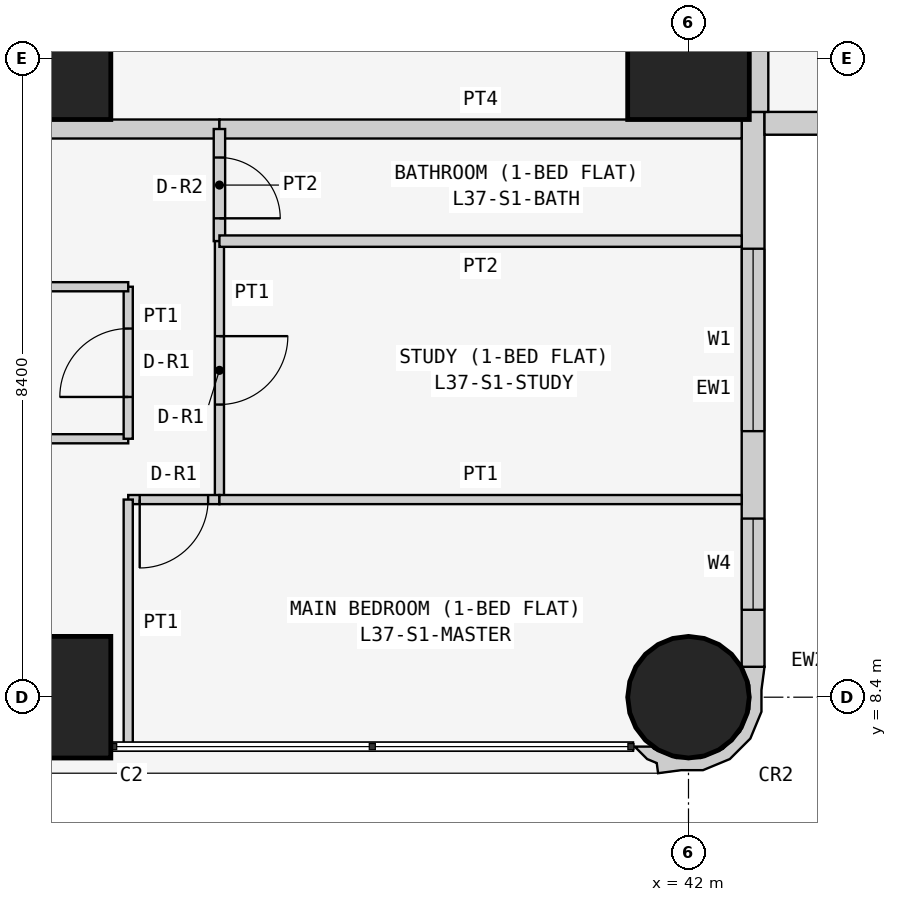
"""IFC4 building model, lengths in metres.
Left out: names, types, materials, properties, quantities, classifications, styles, units other than length and angle.
Written with IfcOpenShell. Run it as: python <this file> out.ifc"""

import sys

from ifc_helpers import new_model, si_unit, direction, frame, frame_2d, origin, origin_2d, place, context, subcontext, project, spatial, polyline, rectangle, circle, outline, extrude, element, fill, save


model = new_model("IFC4")
c1 = context("Model", 3, precision=1e-05, world=origin(), true_north=direction((0.0, 1.0)))
c2 = subcontext(c1, "Body", "Model", "MODEL_VIEW")
j1 = project(units=[si_unit("LENGTHUNIT", "METRE"), si_unit("PLANEANGLEUNIT", "RADIAN")], contexts=[c1])
p1 = place(None, origin())
s1 = spatial("IfcSite", under=j1, at=p1, CompositionType="ELEMENT")
p2 = place(p1, origin())
s2 = spatial("IfcBuilding", under=s1, at=p2, CompositionType="ELEMENT")
p3 = place(p2, frame((0.0, 0.0, 144.9)))
s3 = spatial("IfcBuildingStorey", under=s2, at=p3, CompositionType="ELEMENT", Elevation=144.9)
for number, where, z_axis, x_axis in (
    (1, (33.6, 8.4, 0.0), (0.0, 0.0, 1.0), (1.0, 0.0, 0.0)),
    (2, (33.6, 16.8, 0.0), (0.0, 0.0, 1.0), (1.0, 0.0, 0.0)),
):
    element("IfcColumn", number, at=place(p3, frame(where, z_axis=z_axis, x_axis=x_axis)), inside=s3, PredefinedType="COLUMN", context=c2, shape_type="SweptSolid", body=[
        extrude(rectangle(XDim=1.6, YDim=1.6, at=origin_2d()), origin(), (0.0, 0.0, 1.0), 3.6),
    ])
p4 = place(p3, frame((42.0, 8.4, 0.0), z_axis=(0.0, 0.0, 1.0), x_axis=(1.0, 0.0, 0.0)))
e3 = element("IfcColumn", 3, at=p4, inside=s3, PredefinedType="COLUMN", context=c2, shape_type="SweptSolid", body=[
    extrude(circle(Radius=0.8, at=origin_2d()), origin(), (0.0, 0.0, 1.0), 3.6),
])
p5 = place(p3, frame((42.0, 16.8, 0.0), z_axis=(0.0, 0.0, 1.0), x_axis=(1.0, 0.0, 0.0)))
e4 = element("IfcColumn", 4, at=p5, inside=s3, PredefinedType="COLUMN", context=c2, shape_type="SweptSolid", body=[
    extrude(rectangle(XDim=1.6, YDim=1.6, at=origin_2d()), origin(), (0.0, 0.0, 1.0), 3.6),
])
p6 = place(p3, frame((42.85, 8.8, 0.0), z_axis=(0.0, 0.0, 1.0), x_axis=(0.0, 1.0, 0.0)))
e5 = element("IfcWall", 5, at=p6, inside=s3, PredefinedType="SOLIDWALL", context=c2, shape_type="SweptSolid", body=[
    extrude(rectangle(XDim=7.3, YDim=0.3, at=frame_2d((3.65, 0.0))), origin(), (0.0, 0.0, 1.0), 3.45),
])
p7 = place(p6, frame((3.1, 0.0, 0.9)))
e6 = element("IfcOpeningElement", 6, at=p7, cuts=e5, PredefinedType="OPENING", context=c2, shape_type="SweptSolid", body=[
    extrude(rectangle(XDim=2.4, YDim=1.5, at=frame_2d((1.2, 0.75))), frame((0.0, 0.16, 0.0), z_axis=(0.0, -1.0, 0.0), x_axis=(1.0, 0.0, 0.0)), (0.0, 0.0, 1.0), 0.32),
])
p8 = place(p6, frame((0.75, 0.0, 0.9)))
e7 = element("IfcOpeningElement", 7, at=p8, cuts=e5, PredefinedType="OPENING", context=c2, shape_type="SweptSolid", body=[
    extrude(rectangle(XDim=1.2, YDim=1.5, at=frame_2d((0.6, 0.75))), frame((0.0, 0.16, 0.0), z_axis=(0.0, -1.0, 0.0), x_axis=(1.0, 0.0, 0.0)), (0.0, 0.0, 1.0), 0.32),
])
p9 = place(p3, frame((43.0, 15.95, 0.0), z_axis=(0.0, 0.0, 1.0), x_axis=(1.0, 0.0, 0.0)))
e8 = element("IfcWall", 8, at=p9, inside=s3, PredefinedType="SOLIDWALL", context=c2, shape_type="SweptSolid", body=[
    extrude(rectangle(XDim=15.4, YDim=0.3, at=frame_2d((7.7, 0.0))), origin(), (0.0, 0.0, 1.0), 3.45),
])
p10 = place(p9, frame((1.2, 0.0, 0.9)))
e9 = element("IfcOpeningElement", 9, at=p10, cuts=e8, PredefinedType="OPENING", context=c2, shape_type="SweptSolid", body=[
    extrude(rectangle(XDim=1.8, YDim=1.5, at=frame_2d((0.9, 0.75))), frame((0.0, 0.16, 0.0), z_axis=(0.0, -1.0, 0.0), x_axis=(1.0, 0.0, 0.0)), (0.0, 0.0, 1.0), 0.32),
])
p11 = place(p9, frame((4.95, 0.0, 1.5)))
e10 = element("IfcOpeningElement", 10, at=p11, cuts=e8, PredefinedType="OPENING", context=c2, shape_type="SweptSolid", body=[
    extrude(rectangle(XDim=0.9, YDim=0.7, at=frame_2d((0.45, 0.35))), frame((0.0, 0.16, 0.0), z_axis=(0.0, -1.0, 0.0), x_axis=(1.0, 0.0, 0.0)), (0.0, 0.0, 1.0), 0.32),
])
p12 = place(p9, frame((8.5, 0.0, 0.9)))
e11 = element("IfcOpeningElement", 11, at=p12, cuts=e8, PredefinedType="OPENING", context=c2, shape_type="SweptSolid", body=[
    extrude(rectangle(XDim=1.8, YDim=1.5, at=frame_2d((0.9, 0.75))), frame((0.0, 0.16, 0.0), z_axis=(0.0, -1.0, 0.0), x_axis=(1.0, 0.0, 0.0)), (0.0, 0.0, 1.0), 0.32),
])
p13 = place(p9, frame((12.5, 0.0, 0.0)))
e12 = element("IfcOpeningElement", 12, at=p13, cuts=e8, PredefinedType="OPENING", context=c2, shape_type="SweptSolid", body=[
    extrude(rectangle(XDim=0.9, YDim=2.4, at=frame_2d((0.45, 1.2))), frame((0.0, 0.16, 0.0), z_axis=(0.0, -1.0, 0.0), x_axis=(1.0, 0.0, 0.0)), (0.0, 0.0, 1.0), 0.32),
])
p14 = place(p9, frame((13.5, 0.0, 0.9)))
e13 = element("IfcOpeningElement", 13, at=p14, cuts=e8, PredefinedType="OPENING", context=c2, shape_type="SweptSolid", body=[
    extrude(rectangle(XDim=1.2, YDim=1.5, at=frame_2d((0.6, 0.75))), frame((0.0, 0.16, 0.0), z_axis=(0.0, -1.0, 0.0), x_axis=(1.0, 0.0, 0.0)), (0.0, 0.0, 1.0), 0.32),
])
p15 = place(p3, frame((41.352, 7.805, 0.0), z_axis=(0.0, 0.0, 1.0), x_axis=(0.343276641956, -0.93923434088, 0.0)))
e14 = element("IfcWall", 14, at=p15, inside=s3, PredefinedType="SOLIDWALL", context=c2, shape_type="SweptSolid", body=[
    extrude(outline(polyline([(-0.369, 1.89), (-0.509, 1.621), (-0.49, 1.615), (-0.479, 1.609), (-0.211, 1.62), (0.088, 1.511), (0.323, 1.295), (0.457, 1.006), (0.47, 0.688), (0.361, 0.389), (0.145, 0.154), (0.108, 0.136), (0.031, -0.075), (0.241, 0.023), (0.333, 0.124), (0.465, 0.094), (0.532, 0.393), (0.631, 0.663), (0.614, 1.044), (0.453, 1.391), (0.172, 1.649), (-0.097, 1.748), (-0.369, 1.89)])), origin(), (0.0, 0.0, 1.0), 3.45),
])
p16 = place(p3, frame((42.925, 22.971, 0.0), z_axis=(0.0, 0.0, 1.0), x_axis=(0.0, -1.0, 0.0)))
e15 = element("IfcWall", 15, at=p16, inside=s3, PredefinedType="PARTITIONING", context=c2, shape_type="SweptSolid", body=[
    extrude(rectangle(XDim=6.871, YDim=0.25, at=frame_2d((3.436, 0.0))), origin(), (0.0, 0.0, 1.0), 3.45),
])
p17 = place(p3, frame((35.829, 15.875, 0.0), z_axis=(0.0, 0.0, 1.0), x_axis=(-1.0, 0.0, 0.0)))
e16 = element("IfcWall", 16, at=p17, inside=s3, PredefinedType="PARTITIONING", context=c2, shape_type="SweptSolid", body=[
    extrude(rectangle(XDim=6.429, YDim=0.25, at=frame_2d((3.215, 0.0))), origin(), (0.0, 0.0, 1.0), 3.45),
])
p18 = place(p17, frame((4.929, 0.0, 0.0)))
e17 = element("IfcOpeningElement", 17, at=p18, cuts=e16, PredefinedType="OPENING", context=c2, shape_type="SweptSolid", body=[
    extrude(rectangle(XDim=1.0, YDim=2.1, at=frame_2d((0.5, 1.05))), frame((0.0, 0.135, 0.0), z_axis=(0.0, -1.0, 0.0), x_axis=(1.0, 0.0, 0.0)), (0.0, 0.0, 1.0), 0.27),
])
p19 = place(p3, frame((42.7, 15.875, 0.0), z_axis=(0.0, 0.0, 1.0), x_axis=(-1.0, 0.0, 0.0)))
e18 = element("IfcWall", 18, at=p19, inside=s3, PredefinedType="PARTITIONING", context=c2, shape_type="SweptSolid", body=[
    extrude(rectangle(XDim=6.871, YDim=0.25, at=frame_2d((3.436, 0.0))), origin(), (0.0, 0.0, 1.0), 3.45),
])
p20 = place(p3, frame((29.4, 11.8, 0.0), z_axis=(0.0, 0.0, 1.0), x_axis=(1.0, 0.0, 0.0)))
e19 = element("IfcWall", 19, at=p20, inside=s3, PredefinedType="PARTITIONING", context=c2, shape_type="SweptSolid", body=[
    extrude(rectangle(XDim=5.229, YDim=0.12, at=frame_2d((2.615, 0.0))), origin(), (0.0, 0.0, 1.0), 3.45),
])
p21 = place(p3, frame((34.629, 11.8, 0.0), z_axis=(0.0, 0.0, 1.0), x_axis=(0.0, 1.0, 0.0)))
e20 = element("IfcWall", 20, at=p21, inside=s3, PredefinedType="PARTITIONING", context=c2, shape_type="SweptSolid", body=[
    extrude(rectangle(XDim=2.0, YDim=0.12, at=frame_2d((1.0, 0.0))), origin(), (0.0, 0.0, 1.0), 3.45),
])
p22 = place(p21, frame((0.55, 0.0, 0.0)))
e21 = element("IfcOpeningElement", 21, at=p22, cuts=e20, PredefinedType="OPENING", context=c2, shape_type="SweptSolid", body=[
    extrude(rectangle(XDim=0.9, YDim=2.1, at=frame_2d((0.45, 1.05))), frame((0.0, 0.07, 0.0), z_axis=(0.0, -1.0, 0.0), x_axis=(1.0, 0.0, 0.0)), (0.0, 0.0, 1.0), 0.14),
])
p23 = place(p3, frame((34.629, 13.8, 0.0), z_axis=(0.0, 0.0, 1.0), x_axis=(-1.0, 0.0, 0.0)))
e22 = element("IfcWall", 22, at=p23, inside=s3, PredefinedType="PARTITIONING", context=c2, shape_type="SweptSolid", body=[
    extrude(rectangle(XDim=5.229, YDim=0.12, at=frame_2d((2.615, 0.0))), origin(), (0.0, 0.0, 1.0), 3.45),
])
p24 = place(p3, frame((35.829, 15.875, 0.0), z_axis=(0.0, 0.0, 1.0), x_axis=(0.0, -1.0, 0.0)))
e23 = element("IfcWall", 23, at=p24, inside=s3, PredefinedType="PARTITIONING", context=c2, shape_type="SweptSolid", body=[
    extrude(rectangle(XDim=1.475, YDim=0.15, at=frame_2d((0.738, 0.0))), origin(), (0.0, 0.0, 1.0), 3.45),
])
p25 = place(p24, frame((0.375, 0.0, 0.0)))
e24 = element("IfcOpeningElement", 24, at=p25, cuts=e23, PredefinedType="OPENING", context=c2, shape_type="SweptSolid", body=[
    extrude(rectangle(XDim=0.8, YDim=2.1, at=frame_2d((0.4, 1.05))), frame((0.0, 0.085, 0.0), z_axis=(0.0, -1.0, 0.0), x_axis=(1.0, 0.0, 0.0)), (0.0, 0.0, 1.0), 0.17),
])
p26 = place(p3, frame((35.829, 14.4, 0.0), z_axis=(0.0, 0.0, 1.0), x_axis=(0.0, -1.0, 0.0)))
e25 = element("IfcWall", 25, at=p26, inside=s3, PredefinedType="PARTITIONING", context=c2, shape_type="SweptSolid", body=[
    extrude(rectangle(XDim=3.4, YDim=0.12, at=frame_2d((1.7, 0.0))), origin(), (0.0, 0.0, 1.0), 3.45),
])
p27 = place(p26, frame((1.25, 0.0, 0.0)))
e26 = element("IfcOpeningElement", 26, at=p27, cuts=e25, PredefinedType="OPENING", context=c2, shape_type="SweptSolid", body=[
    extrude(rectangle(XDim=0.9, YDim=2.1, at=frame_2d((0.45, 1.05))), frame((0.0, 0.07, 0.0), z_axis=(0.0, -1.0, 0.0), x_axis=(1.0, 0.0, 0.0)), (0.0, 0.0, 1.0), 0.14),
])
p28 = place(p3, frame((35.829, 11.0, 0.0), z_axis=(0.0, 0.0, 1.0), x_axis=(-1.0, 0.0, 0.0)))
e27 = element("IfcWall", 27, at=p28, inside=s3, PredefinedType="PARTITIONING", context=c2, shape_type="SweptSolid", body=[
    extrude(rectangle(XDim=1.2, YDim=0.12, at=frame_2d((0.6, 0.0))), origin(), (0.0, 0.0, 1.0), 3.45),
])
p29 = place(p28, frame((0.149, 0.0, 0.0)))
e28 = element("IfcOpeningElement", 28, at=p29, cuts=e27, PredefinedType="OPENING", context=c2, shape_type="SweptSolid", body=[
    extrude(rectangle(XDim=0.9, YDim=2.1, at=frame_2d((0.45, 1.05))), frame((0.0, 0.07, 0.0), z_axis=(0.0, -1.0, 0.0), x_axis=(1.0, 0.0, 0.0)), (0.0, 0.0, 1.0), 0.14),
])
p30 = place(p3, frame((34.629, 11.0, 0.0), z_axis=(0.0, 0.0, 1.0), x_axis=(0.0, -1.0, 0.0)))
e29 = element("IfcWall", 29, at=p30, inside=s3, PredefinedType="PARTITIONING", context=c2, shape_type="SweptSolid", body=[
    extrude(rectangle(XDim=3.25, YDim=0.12, at=frame_2d((1.625, 0.0))), origin(), (0.0, 0.0, 1.0), 3.45),
])
p31 = place(p3, frame((35.829, 14.4, 0.0), z_axis=(0.0, 0.0, 1.0), x_axis=(1.0, 0.0, 0.0)))
e30 = element("IfcWall", 30, at=p31, inside=s3, PredefinedType="PARTITIONING", context=c2, shape_type="SweptSolid", body=[
    extrude(rectangle(XDim=6.871, YDim=0.15, at=frame_2d((3.436, 0.0))), origin(), (0.0, 0.0, 1.0), 3.45),
])
p32 = place(p3, frame((35.829, 11.0, 0.0), z_axis=(0.0, 0.0, 1.0), x_axis=(1.0, 0.0, 0.0)))
e31 = element("IfcWall", 31, at=p32, inside=s3, PredefinedType="PARTITIONING", context=c2, shape_type="SweptSolid", body=[
    extrude(rectangle(XDim=6.871, YDim=0.12, at=frame_2d((3.436, 0.0))), origin(), (0.0, 0.0, 1.0), 3.45),
])
p33 = place(p7, origin())
e32 = element("IfcWindow", 32, at=p33, inside=s3, PartitioningType="SINGLE_PANEL", PredefinedType="WINDOW", context=c2, shape_type="SweptSolid", body=[
    extrude(rectangle(XDim=2.4, YDim=1.5, at=frame_2d((1.2, 0.75))), frame((0.0, 0.03, 0.0), z_axis=(0.0, -1.0, 0.0), x_axis=(1.0, 0.0, 0.0)), (0.0, 0.0, 1.0), 0.06),
])
fill(e6, e32)
p34 = place(p8, origin())
e33 = element("IfcWindow", 33, at=p34, inside=s3, PartitioningType="SINGLE_PANEL", PredefinedType="WINDOW", context=c2, shape_type="SweptSolid", body=[
    extrude(rectangle(XDim=1.2, YDim=1.5, at=frame_2d((0.6, 0.75))), frame((0.0, 0.03, 0.0), z_axis=(0.0, -1.0, 0.0), x_axis=(1.0, 0.0, 0.0)), (0.0, 0.0, 1.0), 0.06),
])
fill(e7, e33)
p35 = place(p22, origin())
e34 = element("IfcDoor", 34, at=p35, inside=s3, OperationType="SINGLE_SWING_LEFT", PredefinedType="DOOR", context=c2, shape_type="SweptSolid", body=[
    extrude(rectangle(XDim=0.9, YDim=2.1, at=frame_2d((0.45, 1.05))), frame((0.0, 0.025, 0.0), z_axis=(0.0, -1.0, 0.0), x_axis=(1.0, 0.0, 0.0)), (0.0, 0.0, 1.0), 0.05),
])
fill(e21, e34)
p36 = place(p25, origin())
e35 = element("IfcDoor", 35, at=p36, inside=s3, OperationType="SINGLE_SWING_RIGHT", PredefinedType="DOOR", context=c2, shape_type="SweptSolid", body=[
    extrude(rectangle(XDim=0.8, YDim=2.1, at=frame_2d((0.4, 1.05))), frame((0.0, 0.025, 0.0), z_axis=(0.0, -1.0, 0.0), x_axis=(1.0, 0.0, 0.0)), (0.0, 0.0, 1.0), 0.05),
])
fill(e24, e35)
p37 = place(p27, origin())
e36 = element("IfcDoor", 36, at=p37, inside=s3, OperationType="SINGLE_SWING_LEFT", PredefinedType="DOOR", context=c2, shape_type="SweptSolid", body=[
    extrude(rectangle(XDim=0.9, YDim=2.1, at=frame_2d((0.45, 1.05))), frame((0.0, 0.025, 0.0), z_axis=(0.0, -1.0, 0.0), x_axis=(1.0, 0.0, 0.0)), (0.0, 0.0, 1.0), 0.05),
])
fill(e26, e36)
p38 = place(p29, origin())
e37 = element("IfcDoor", 37, at=p38, inside=s3, OperationType="SINGLE_SWING_RIGHT", PredefinedType="DOOR", context=c2, shape_type="SweptSolid", body=[
    extrude(rectangle(XDim=0.9, YDim=2.1, at=frame_2d((0.45, 1.05))), frame((0.0, 0.025, 0.0), z_axis=(0.0, -1.0, 0.0), x_axis=(1.0, 0.0, 0.0)), (0.0, 0.0, 1.0), 0.05),
])
fill(e28, e37)
save(model, sys.argv[1])
